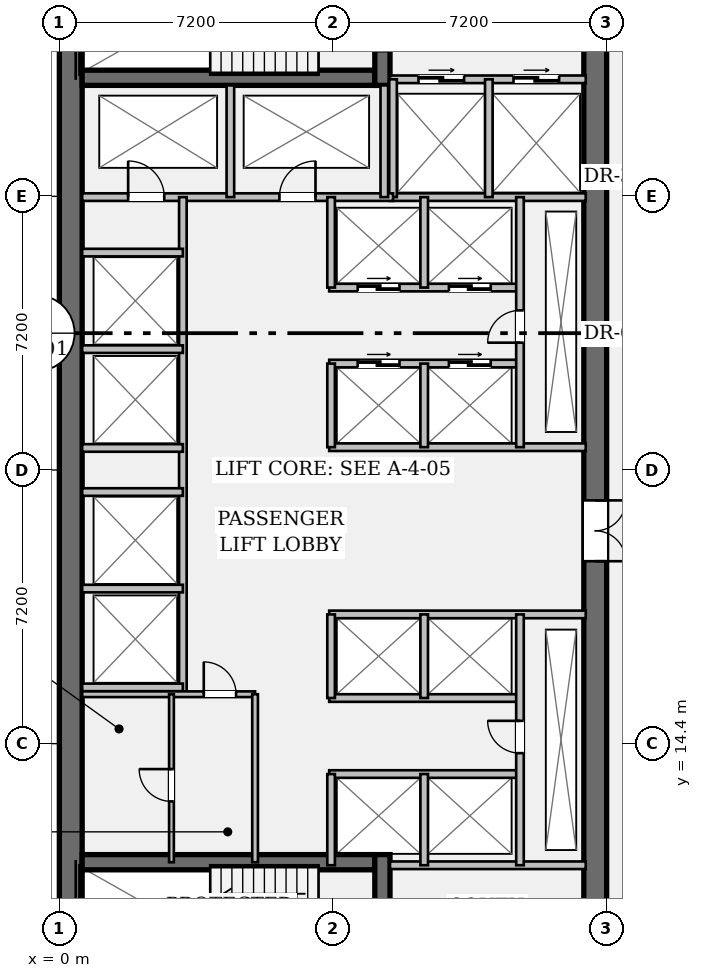
"""IFC4 building model, lengths in metres.
Left out: names, types, materials, properties, quantities, classifications, styles, units other than length and angle.
Written with IfcOpenShell. Run it as: python <this file> out.ifc"""

import sys

from ifc_helpers import new_model, si_unit, direction, frame, frame_2d, origin, place, context, subcontext, project, spatial, rectangle, extrude, element, fill, save


model = new_model("IFC4")
c1 = context("Model", 3, precision=1e-05, world=origin(), true_north=direction((0.0, 1.0)))
c2 = subcontext(c1, "Body", "Model", "MODEL_VIEW")
j1 = project(units=[si_unit("LENGTHUNIT", "METRE"), si_unit("PLANEANGLEUNIT", "RADIAN")], contexts=[c1])
p1 = place(None, origin())
s1 = spatial("IfcSite", under=j1, at=p1, CompositionType="ELEMENT")
p2 = place(p1, origin())
s2 = spatial("IfcBuilding", under=s1, at=p2, CompositionType="ELEMENT")
p3 = place(p2, frame((0.0, 0.0, 77.35)))
s3 = spatial("IfcBuildingStorey", under=s2, at=p3, CompositionType="ELEMENT", Elevation=77.35)
p4 = place(p3, frame((0.3, 7.2, 0.0), z_axis=(0.0, 0.0, 1.0), x_axis=(0.0, 1.0, 0.0)))
e1 = element("IfcWall", 1, at=p4, inside=s3, PredefinedType="SHEAR", context=c2, shape_type="SweptSolid", body=[
    extrude(rectangle(XDim=28.8, YDim=0.6, at=frame_2d((14.4, 0.0))), origin(), (0.0, 0.0, 1.0), 3.57),
])
p5 = place(p3, frame((14.1, 35.4, 0.0), z_axis=(0.0, 0.0, 1.0), x_axis=(0.0, -1.0, 0.0)))
e2 = element("IfcWall", 2, at=p5, inside=s3, PredefinedType="SHEAR", context=c2, shape_type="SweptSolid", body=[
    extrude(rectangle(XDim=27.6, YDim=0.6, at=frame_2d((13.8, 0.0))), origin(), (0.0, 0.0, 1.0), 3.57),
])
p6 = place(p5, frame((1.3, 0.0, 0.0)))
e3 = element("IfcOpeningElement", 3, at=p6, cuts=e2, PredefinedType="OPENING", context=c2, shape_type="SweptSolid", body=[
    extrude(rectangle(XDim=1.2, YDim=2.15, at=frame_2d((0.6, 1.075))), frame((0.0, 0.312, 0.0), z_axis=(0.0, -1.0, 0.0), x_axis=(1.0, 0.0, 0.0)), (0.0, 0.0, 1.0), 0.624),
])
p7 = place(p5, frame((25.25, 0.0, 0.0)))
e4 = element("IfcOpeningElement", 4, at=p7, cuts=e2, PredefinedType="OPENING", context=c2, shape_type="SweptSolid", body=[
    extrude(rectangle(XDim=1.2, YDim=2.15, at=frame_2d((0.6, 1.075))), frame((0.0, 0.312, 0.0), z_axis=(0.0, -1.0, 0.0), x_axis=(1.0, 0.0, 0.0)), (0.0, 0.0, 1.0), 0.624),
])
p8 = place(p5, frame((14.6, 0.0, 0.0)))
e5 = element("IfcOpeningElement", 5, at=p8, cuts=e2, PredefinedType="OPENING", context=c2, shape_type="SweptSolid", body=[
    extrude(rectangle(XDim=1.6, YDim=2.2, at=frame_2d((0.8, 1.1))), frame((0.0, 0.312, 0.0), z_axis=(0.0, -1.0, 0.0), x_axis=(1.0, 0.0, 0.0)), (0.0, 0.0, 1.0), 0.624),
])
for number, where, z_axis, x_axis in (
    (6, (0.6, 31.92, 0.0), (0.0, 0.0, 1.0), (1.0, 0.0, 0.0)),
    (7, (0.6, 11.28, 0.0), (0.0, 0.0, 1.0), (1.0, 0.0, 0.0)),
):
    element("IfcWall", number, at=place(p3, frame(where, z_axis=z_axis, x_axis=x_axis)), inside=s3, PredefinedType="SHEAR", context=c2, shape_type="SweptSolid", body=[
        extrude(rectangle(XDim=7.7, YDim=0.4, at=frame_2d((3.85, 0.0))), origin(), (0.0, 0.0, 1.0), 3.57),
    ])
p9 = place(p3, frame((8.5, 31.72, 0.0), z_axis=(0.0, 0.0, 1.0), x_axis=(0.0, 1.0, 0.0)))
e8 = element("IfcWall", 8, at=p9, inside=s3, PredefinedType="SHEAR", context=c2, shape_type="SweptSolid", body=[
    extrude(rectangle(XDim=3.68, YDim=0.4, at=frame_2d((1.84, 0.0))), origin(), (0.0, 0.0, 1.0), 3.57),
])
p10 = place(p9, frame((0.9, 0.0, 0.0)))
e9 = element("IfcOpeningElement", 9, at=p10, cuts=e8, PredefinedType="OPENING", context=c2, shape_type="SweptSolid", body=[
    extrude(rectangle(XDim=1.1, YDim=2.15, at=frame_2d((0.55, 1.075))), frame((0.0, 0.212, 0.0), z_axis=(0.0, -1.0, 0.0), x_axis=(1.0, 0.0, 0.0)), (0.0, 0.0, 1.0), 0.424),
])
p11 = place(p3, frame((8.5, 7.8, 0.0), z_axis=(0.0, 0.0, 1.0), x_axis=(0.0, 1.0, 0.0)))
e10 = element("IfcWall", 10, at=p11, inside=s3, PredefinedType="SHEAR", context=c2, shape_type="SweptSolid", body=[
    extrude(rectangle(XDim=3.68, YDim=0.4, at=frame_2d((1.84, 0.0))), origin(), (0.0, 0.0, 1.0), 3.57),
])
p12 = place(p11, frame((0.85, 0.0, 0.0)))
e11 = element("IfcOpeningElement", 11, at=p12, cuts=e10, PredefinedType="OPENING", context=c2, shape_type="SweptSolid", body=[
    extrude(rectangle(XDim=1.1, YDim=2.15, at=frame_2d((0.55, 1.075))), frame((0.0, 0.212, 0.0), z_axis=(0.0, -1.0, 0.0), x_axis=(1.0, 0.0, 0.0)), (0.0, 0.0, 1.0), 0.424),
])
p13 = place(p3, frame((8.7, 31.88, 0.0), z_axis=(0.0, 0.0, 1.0), x_axis=(1.0, 0.0, 0.0)))
e12 = element("IfcWall", 12, at=p13, inside=s3, PredefinedType="PARTITIONING", context=c2, shape_type="SweptSolid", body=[
    extrude(rectangle(XDim=5.15, YDim=0.2, at=frame_2d((2.575, 0.0))), origin(), (0.0, 0.0, 1.0), 3.57),
])
p14 = place(p13, frame((0.75, 0.0, 0.0)))
e13 = element("IfcOpeningElement", 13, at=p14, cuts=e12, PredefinedType="OPENING", context=c2, shape_type="SweptSolid", body=[
    extrude(rectangle(XDim=1.2, YDim=2.2, at=frame_2d((0.6, 1.1))), frame((0.0, 0.112, 0.0), z_axis=(0.0, -1.0, 0.0), x_axis=(1.0, 0.0, 0.0)), (0.0, 0.0, 1.0), 0.224),
])
p15 = place(p13, frame((3.25, 0.0, 0.0)))
e14 = element("IfcOpeningElement", 14, at=p15, cuts=e12, PredefinedType="OPENING", context=c2, shape_type="SweptSolid", body=[
    extrude(rectangle(XDim=1.2, YDim=2.2, at=frame_2d((0.6, 1.1))), frame((0.0, 0.112, 0.0), z_axis=(0.0, -1.0, 0.0), x_axis=(1.0, 0.0, 0.0)), (0.0, 0.0, 1.0), 0.224),
])
for number, where, z_axis, x_axis in (
    (15, (8.7, 11.2, 0.0), (0.0, 0.0, 1.0), (1.0, 0.0, 0.0)),
    (16, (8.7, 28.78, 0.0), (0.0, 0.0, 1.0), (1.0, 0.0, 0.0)),
):
    element("IfcWall", number, at=place(p3, frame(where, z_axis=z_axis, x_axis=x_axis)), inside=s3, PredefinedType="PARTITIONING", context=c2, shape_type="SweptSolid", body=[
        extrude(rectangle(XDim=5.15, YDim=0.2, at=frame_2d((2.575, 0.0))), origin(), (0.0, 0.0, 1.0), 3.57),
    ])
for number, where, z_axis, x_axis in (
    (17, (8.78, 28.78, 0.0), (0.0, 0.0, 1.0), (0.0, 1.0, 0.0)),
    (18, (11.3, 28.78, 0.0), (0.0, 0.0, 1.0), (0.0, 1.0, 0.0)),
):
    element("IfcWall", number, at=place(p3, frame(where, z_axis=z_axis, x_axis=x_axis)), inside=s3, PredefinedType="PARTITIONING", context=c2, shape_type="SweptSolid", body=[
        extrude(rectangle(XDim=3.1, YDim=0.2, at=frame_2d((1.55, 0.0))), origin(), (0.0, 0.0, 1.0), 3.57),
    ])
p16 = place(p3, frame((0.6, 28.78, 0.0), z_axis=(0.0, 0.0, 1.0), x_axis=(1.0, 0.0, 0.0)))
e19 = element("IfcWall", 19, at=p16, inside=s3, PredefinedType="PARTITIONING", context=c2, shape_type="SweptSolid", body=[
    extrude(rectangle(XDim=8.18, YDim=0.2, at=frame_2d((4.09, 0.0))), origin(), (0.0, 0.0, 1.0), 3.57),
])
p17 = place(p16, frame((1.21, 0.0, 0.0)))
e20 = element("IfcOpeningElement", 20, at=p17, cuts=e19, PredefinedType="OPENING", context=c2, shape_type="SweptSolid", body=[
    extrude(rectangle(XDim=0.95, YDim=2.15, at=frame_2d((0.475, 1.075))), frame((0.0, 0.112, 0.0), z_axis=(0.0, -1.0, 0.0), x_axis=(1.0, 0.0, 0.0)), (0.0, 0.0, 1.0), 0.224),
])
p18 = place(p16, frame((5.19, 0.0, 0.0)))
e21 = element("IfcOpeningElement", 21, at=p18, cuts=e19, PredefinedType="OPENING", context=c2, shape_type="SweptSolid", body=[
    extrude(rectangle(XDim=0.95, YDim=2.15, at=frame_2d((0.475, 1.075))), frame((0.0, 0.112, 0.0), z_axis=(0.0, -1.0, 0.0), x_axis=(1.0, 0.0, 0.0)), (0.0, 0.0, 1.0), 0.224),
])
for number, where, z_axis, x_axis in (
    (22, (4.5, 28.78, 0.0), (0.0, 0.0, 1.0), (0.0, 1.0, 0.0)),
    (23, (8.55, 28.78, 0.0), (0.0, 0.0, 1.0), (0.0, 1.0, 0.0)),
):
    element("IfcWall", number, at=place(p3, frame(where, z_axis=z_axis, x_axis=x_axis)), inside=s3, PredefinedType="PARTITIONING", context=c2, shape_type="SweptSolid", body=[
        extrude(rectangle(XDim=2.94, YDim=0.2, at=frame_2d((1.47, 0.0))), origin(), (0.0, 0.0, 1.0), 3.57),
    ])
p19 = place(p3, frame((3.25, 15.7, 0.0), z_axis=(0.0, 0.0, 1.0), x_axis=(0.0, 1.0, 0.0)))
e24 = element("IfcWall", 24, at=p19, inside=s3, PredefinedType="PARTITIONING", context=c2, shape_type="SweptSolid", body=[
    extrude(rectangle(XDim=13.08, YDim=0.2, at=frame_2d((6.54, 0.0))), origin(), (0.0, 0.0, 1.0), 3.57),
])
for number, where, z_axis, x_axis in (
    (25, (0.6, 15.88, 0.0), (0.0, 0.0, 1.0), (1.0, 0.0, 0.0)),
    (26, (0.6, 18.48, 0.0), (0.0, 0.0, 1.0), (1.0, 0.0, 0.0)),
    (27, (0.6, 22.18, 0.0), (0.0, 0.0, 1.0), (1.0, 0.0, 0.0)),
    (28, (0.6, 24.78, 0.0), (0.0, 0.0, 1.0), (1.0, 0.0, 0.0)),
    (29, (0.6, 21.02, 0.0), (0.0, 0.0, 1.0), (1.0, 0.0, 0.0)),
    (30, (0.6, 27.32, 0.0), (0.0, 0.0, 1.0), (1.0, 0.0, 0.0)),
):
    element("IfcWall", number, at=place(p3, frame(where, z_axis=z_axis, x_axis=x_axis)), inside=s3, PredefinedType="PARTITIONING", context=c2, shape_type="SweptSolid", body=[
        extrude(rectangle(XDim=2.65, YDim=0.2, at=frame_2d((1.325, 0.0))), origin(), (0.0, 0.0, 1.0), 3.57),
    ])
p20 = place(p3, frame((7.1, 22.2, 0.0), z_axis=(0.0, 0.0, 1.0), x_axis=(1.0, 0.0, 0.0)))
e31 = element("IfcWall", 31, at=p20, inside=s3, PredefinedType="PARTITIONING", context=c2, shape_type="SweptSolid", body=[
    extrude(rectangle(XDim=6.75, YDim=0.2, at=frame_2d((3.375, 0.0))), origin(), (0.0, 0.0, 1.0), 3.57),
])
p21 = place(p3, frame((7.1, 24.4, 0.0), z_axis=(0.0, 0.0, 1.0), x_axis=(1.0, 0.0, 0.0)))
e32 = element("IfcWall", 32, at=p21, inside=s3, PredefinedType="PARTITIONING", context=c2, shape_type="SweptSolid", body=[
    extrude(rectangle(XDim=5.02, YDim=0.2, at=frame_2d((2.51, 0.0))), origin(), (0.0, 0.0, 1.0), 3.57),
])
p22 = place(p21, frame((0.75, 0.0, 0.0)))
e33 = element("IfcOpeningElement", 33, at=p22, cuts=e32, PredefinedType="OPENING", context=c2, shape_type="SweptSolid", body=[
    extrude(rectangle(XDim=1.1, YDim=2.2, at=frame_2d((0.55, 1.1))), frame((0.0, 0.112, 0.0), z_axis=(0.0, -1.0, 0.0), x_axis=(1.0, 0.0, 0.0)), (0.0, 0.0, 1.0), 0.224),
])
p23 = place(p21, frame((3.15, 0.0, 0.0)))
e34 = element("IfcOpeningElement", 34, at=p23, cuts=e32, PredefinedType="OPENING", context=c2, shape_type="SweptSolid", body=[
    extrude(rectangle(XDim=1.1, YDim=2.2, at=frame_2d((0.55, 1.1))), frame((0.0, 0.112, 0.0), z_axis=(0.0, -1.0, 0.0), x_axis=(1.0, 0.0, 0.0)), (0.0, 0.0, 1.0), 0.224),
])
p24 = place(p3, frame((7.1, 26.4, 0.0), z_axis=(0.0, 0.0, 1.0), x_axis=(1.0, 0.0, 0.0)))
e35 = element("IfcWall", 35, at=p24, inside=s3, PredefinedType="PARTITIONING", context=c2, shape_type="SweptSolid", body=[
    extrude(rectangle(XDim=5.02, YDim=0.2, at=frame_2d((2.51, 0.0))), origin(), (0.0, 0.0, 1.0), 3.57),
])
p25 = place(p24, frame((0.75, 0.0, 0.0)))
e36 = element("IfcOpeningElement", 36, at=p25, cuts=e35, PredefinedType="OPENING", context=c2, shape_type="SweptSolid", body=[
    extrude(rectangle(XDim=1.1, YDim=2.2, at=frame_2d((0.55, 1.1))), frame((0.0, 0.112, 0.0), z_axis=(0.0, -1.0, 0.0), x_axis=(1.0, 0.0, 0.0)), (0.0, 0.0, 1.0), 0.224),
])
p26 = place(p24, frame((3.15, 0.0, 0.0)))
e37 = element("IfcOpeningElement", 37, at=p26, cuts=e35, PredefinedType="OPENING", context=c2, shape_type="SweptSolid", body=[
    extrude(rectangle(XDim=1.1, YDim=2.2, at=frame_2d((0.55, 1.1))), frame((0.0, 0.112, 0.0), z_axis=(0.0, -1.0, 0.0), x_axis=(1.0, 0.0, 0.0)), (0.0, 0.0, 1.0), 0.224),
])
p27 = place(p3, frame((7.15, 22.2, 0.0), z_axis=(0.0, 0.0, 1.0), x_axis=(0.0, 1.0, 0.0)))
e38 = element("IfcWall", 38, at=p27, inside=s3, PredefinedType="PARTITIONING", context=c2, shape_type="SweptSolid", body=[
    extrude(rectangle(XDim=2.2, YDim=0.2, at=frame_2d((1.1, 0.0))), origin(), (0.0, 0.0, 1.0), 3.57),
])
p28 = place(p3, frame((7.15, 26.4, 0.0), z_axis=(0.0, 0.0, 1.0), x_axis=(0.0, 1.0, 0.0)))
e39 = element("IfcWall", 39, at=p28, inside=s3, PredefinedType="PARTITIONING", context=c2, shape_type="SweptSolid", body=[
    extrude(rectangle(XDim=2.38, YDim=0.2, at=frame_2d((1.19, 0.0))), origin(), (0.0, 0.0, 1.0), 3.57),
])
p29 = place(p3, frame((9.6, 22.2, 0.0), z_axis=(0.0, 0.0, 1.0), x_axis=(0.0, 1.0, 0.0)))
e40 = element("IfcWall", 40, at=p29, inside=s3, PredefinedType="PARTITIONING", context=c2, shape_type="SweptSolid", body=[
    extrude(rectangle(XDim=2.2, YDim=0.2, at=frame_2d((1.1, 0.0))), origin(), (0.0, 0.0, 1.0), 3.57),
])
p30 = place(p3, frame((9.6, 26.4, 0.0), z_axis=(0.0, 0.0, 1.0), x_axis=(0.0, 1.0, 0.0)))
e41 = element("IfcWall", 41, at=p30, inside=s3, PredefinedType="PARTITIONING", context=c2, shape_type="SweptSolid", body=[
    extrude(rectangle(XDim=2.38, YDim=0.2, at=frame_2d((1.19, 0.0))), origin(), (0.0, 0.0, 1.0), 3.57),
])
p31 = place(p3, frame((12.12, 22.2, 0.0), z_axis=(0.0, 0.0, 1.0), x_axis=(0.0, 1.0, 0.0)))
e42 = element("IfcWall", 42, at=p31, inside=s3, PredefinedType="PARTITIONING", context=c2, shape_type="SweptSolid", body=[
    extrude(rectangle(XDim=6.58, YDim=0.2, at=frame_2d((3.29, 0.0))), origin(), (0.0, 0.0, 1.0), 3.57),
])
p32 = place(p31, frame((2.75, 0.0, 0.0)))
e43 = element("IfcOpeningElement", 43, at=p32, cuts=e42, PredefinedType="OPENING", context=c2, shape_type="SweptSolid", body=[
    extrude(rectangle(XDim=0.85, YDim=2.15, at=frame_2d((0.425, 1.075))), frame((0.0, 0.112, 0.0), z_axis=(0.0, -1.0, 0.0), x_axis=(1.0, 0.0, 0.0)), (0.0, 0.0, 1.0), 0.224),
])
p33 = place(p3, frame((7.1, 17.8, 0.0), z_axis=(0.0, 0.0, 1.0), x_axis=(1.0, 0.0, 0.0)))
e44 = element("IfcWall", 44, at=p33, inside=s3, PredefinedType="PARTITIONING", context=c2, shape_type="SweptSolid", body=[
    extrude(rectangle(XDim=6.75, YDim=0.2, at=frame_2d((3.375, 0.0))), origin(), (0.0, 0.0, 1.0), 3.57),
])
for number, where, z_axis, x_axis in (
    (45, (7.1, 15.6, 0.0), (0.0, 0.0, 1.0), (1.0, 0.0, 0.0)),
    (46, (7.1, 13.6, 0.0), (0.0, 0.0, 1.0), (1.0, 0.0, 0.0)),
):
    element("IfcWall", number, at=place(p3, frame(where, z_axis=z_axis, x_axis=x_axis)), inside=s3, PredefinedType="PARTITIONING", context=c2, shape_type="SweptSolid", body=[
        extrude(rectangle(XDim=5.02, YDim=0.2, at=frame_2d((2.51, 0.0))), origin(), (0.0, 0.0, 1.0), 3.57),
    ])
p34 = place(p3, frame((7.15, 15.6, 0.0), z_axis=(0.0, 0.0, 1.0), x_axis=(0.0, 1.0, 0.0)))
e47 = element("IfcWall", 47, at=p34, inside=s3, PredefinedType="PARTITIONING", context=c2, shape_type="SweptSolid", body=[
    extrude(rectangle(XDim=2.2, YDim=0.2, at=frame_2d((1.1, 0.0))), origin(), (0.0, 0.0, 1.0), 3.57),
])
p35 = place(p3, frame((7.15, 11.2, 0.0), z_axis=(0.0, 0.0, 1.0), x_axis=(0.0, 1.0, 0.0)))
e48 = element("IfcWall", 48, at=p35, inside=s3, PredefinedType="PARTITIONING", context=c2, shape_type="SweptSolid", body=[
    extrude(rectangle(XDim=2.4, YDim=0.2, at=frame_2d((1.2, 0.0))), origin(), (0.0, 0.0, 1.0), 3.57),
])
p36 = place(p3, frame((9.6, 15.6, 0.0), z_axis=(0.0, 0.0, 1.0), x_axis=(0.0, 1.0, 0.0)))
e49 = element("IfcWall", 49, at=p36, inside=s3, PredefinedType="PARTITIONING", context=c2, shape_type="SweptSolid", body=[
    extrude(rectangle(XDim=2.2, YDim=0.2, at=frame_2d((1.1, 0.0))), origin(), (0.0, 0.0, 1.0), 3.57),
])
p37 = place(p3, frame((9.6, 11.2, 0.0), z_axis=(0.0, 0.0, 1.0), x_axis=(0.0, 1.0, 0.0)))
e50 = element("IfcWall", 50, at=p37, inside=s3, PredefinedType="PARTITIONING", context=c2, shape_type="SweptSolid", body=[
    extrude(rectangle(XDim=2.4, YDim=0.2, at=frame_2d((1.2, 0.0))), origin(), (0.0, 0.0, 1.0), 3.57),
])
p38 = place(p3, frame((12.12, 11.2, 0.0), z_axis=(0.0, 0.0, 1.0), x_axis=(0.0, 1.0, 0.0)))
e51 = element("IfcWall", 51, at=p38, inside=s3, PredefinedType="PARTITIONING", context=c2, shape_type="SweptSolid", body=[
    extrude(rectangle(XDim=6.6, YDim=0.2, at=frame_2d((3.3, 0.0))), origin(), (0.0, 0.0, 1.0), 3.57),
])
p39 = place(p38, frame((2.95, 0.0, 0.0)))
e52 = element("IfcOpeningElement", 52, at=p39, cuts=e51, PredefinedType="OPENING", context=c2, shape_type="SweptSolid", body=[
    extrude(rectangle(XDim=0.85, YDim=2.15, at=frame_2d((0.425, 1.075))), frame((0.0, 0.112, 0.0), z_axis=(0.0, -1.0, 0.0), x_axis=(1.0, 0.0, 0.0)), (0.0, 0.0, 1.0), 0.224),
])
p40 = place(p3, frame((0.6, 15.7, 0.0), z_axis=(0.0, 0.0, 1.0), x_axis=(1.0, 0.0, 0.0)))
e53 = element("IfcWall", 53, at=p40, inside=s3, PredefinedType="PARTITIONING", context=c2, shape_type="SweptSolid", body=[
    extrude(rectangle(XDim=4.55, YDim=0.15, at=frame_2d((2.275, 0.0))), origin(), (0.0, 0.0, 1.0), 3.57),
])
p41 = place(p40, frame((3.2, 0.0, 0.0)))
e54 = element("IfcOpeningElement", 54, at=p41, cuts=e53, PredefinedType="OPENING", context=c2, shape_type="SweptSolid", body=[
    extrude(rectangle(XDim=0.85, YDim=2.15, at=frame_2d((0.425, 1.075))), frame((0.0, 0.087, 0.0), z_axis=(0.0, -1.0, 0.0), x_axis=(1.0, 0.0, 0.0)), (0.0, 0.0, 1.0), 0.174),
])
p42 = place(p3, frame((5.15, 11.28, 0.0), z_axis=(0.0, 0.0, 1.0), x_axis=(0.0, 1.0, 0.0)))
e55 = element("IfcWall", 55, at=p42, inside=s3, PredefinedType="PARTITIONING", context=c2, shape_type="SweptSolid", body=[
    extrude(rectangle(XDim=4.42, YDim=0.15, at=frame_2d((2.21, 0.0))), origin(), (0.0, 0.0, 1.0), 3.57),
])
p43 = place(p3, frame((2.95, 11.28, 0.0), z_axis=(0.0, 0.0, 1.0), x_axis=(0.0, 1.0, 0.0)))
e56 = element("IfcWall", 56, at=p43, inside=s3, PredefinedType="PARTITIONING", context=c2, shape_type="SweptSolid", body=[
    extrude(rectangle(XDim=4.42, YDim=0.125, at=frame_2d((2.21, 0.0))), origin(), (0.0, 0.0, 1.0), 3.57),
])
p44 = place(p43, frame((1.6, 0.0, 0.0)))
e57 = element("IfcOpeningElement", 57, at=p44, cuts=e56, PredefinedType="OPENING", context=c2, shape_type="SweptSolid", body=[
    extrude(rectangle(XDim=0.85, YDim=2.15, at=frame_2d((0.425, 1.075))), frame((0.0, 0.074, 0.0), z_axis=(0.0, -1.0, 0.0), x_axis=(1.0, 0.0, 0.0)), (0.0, 0.0, 1.0), 0.149),
])
p45 = place(p14, origin())
e58 = element("IfcDoor", 58, at=p45, inside=s3, OperationType="DOUBLE_DOOR_SLIDING", PredefinedType="DOOR", context=c2, shape_type="SweptSolid", body=[
    extrude(rectangle(XDim=1.2, YDim=2.2, at=frame_2d((0.6, 1.1))), frame((0.0, 0.025, 0.0), z_axis=(0.0, -1.0, 0.0), x_axis=(1.0, 0.0, 0.0)), (0.0, 0.0, 1.0), 0.05),
])
fill(e13, e58)
p46 = place(p15, origin())
e59 = element("IfcDoor", 59, at=p46, inside=s3, OperationType="DOUBLE_DOOR_SLIDING", PredefinedType="DOOR", context=c2, shape_type="SweptSolid", body=[
    extrude(rectangle(XDim=1.2, YDim=2.2, at=frame_2d((0.6, 1.1))), frame((0.0, 0.025, 0.0), z_axis=(0.0, -1.0, 0.0), x_axis=(1.0, 0.0, 0.0)), (0.0, 0.0, 1.0), 0.05),
])
fill(e14, e59)
p47 = place(p17, origin())
e60 = element("IfcDoor", 60, at=p47, inside=s3, OperationType="SINGLE_SWING_LEFT", PredefinedType="DOOR", context=c2, shape_type="SweptSolid", body=[
    extrude(rectangle(XDim=0.95, YDim=2.15, at=frame_2d((0.475, 1.075))), frame((0.0, 0.025, 0.0), z_axis=(0.0, -1.0, 0.0), x_axis=(1.0, 0.0, 0.0)), (0.0, 0.0, 1.0), 0.05),
])
fill(e20, e60)
p48 = place(p18, origin())
e61 = element("IfcDoor", 61, at=p48, inside=s3, OperationType="SINGLE_SWING_RIGHT", PredefinedType="DOOR", context=c2, shape_type="SweptSolid", body=[
    extrude(rectangle(XDim=0.95, YDim=2.15, at=frame_2d((0.475, 1.075))), frame((0.0, 0.025, 0.0), z_axis=(0.0, -1.0, 0.0), x_axis=(1.0, 0.0, 0.0)), (0.0, 0.0, 1.0), 0.05),
])
fill(e21, e61)
p49 = place(p8, origin())
e62 = element("IfcDoor", 62, at=p49, inside=s3, OperationType="DOUBLE_DOOR_SINGLE_SWING", PredefinedType="DOOR", context=c2, shape_type="SweptSolid", body=[
    extrude(rectangle(XDim=1.6, YDim=2.2, at=frame_2d((0.8, 1.1))), frame((0.0, 0.025, 0.0), z_axis=(0.0, -1.0, 0.0), x_axis=(1.0, 0.0, 0.0)), (0.0, 0.0, 1.0), 0.05),
])
fill(e5, e62)
p50 = place(p32, origin())
e63 = element("IfcDoor", 63, at=p50, inside=s3, OperationType="SINGLE_SWING_LEFT", PredefinedType="DOOR", context=c2, shape_type="SweptSolid", body=[
    extrude(rectangle(XDim=0.85, YDim=2.15, at=frame_2d((0.425, 1.075))), frame((0.0, 0.025, 0.0), z_axis=(0.0, -1.0, 0.0), x_axis=(1.0, 0.0, 0.0)), (0.0, 0.0, 1.0), 0.05),
])
fill(e43, e63)
p51 = place(p22, origin())
e64 = element("IfcDoor", 64, at=p51, inside=s3, OperationType="DOUBLE_DOOR_SLIDING", PredefinedType="DOOR", context=c2, shape_type="SweptSolid", body=[
    extrude(rectangle(XDim=1.1, YDim=2.2, at=frame_2d((0.55, 1.1))), frame((0.0, 0.025, 0.0), z_axis=(0.0, -1.0, 0.0), x_axis=(1.0, 0.0, 0.0)), (0.0, 0.0, 1.0), 0.05),
])
fill(e33, e64)
p52 = place(p23, origin())
e65 = element("IfcDoor", 65, at=p52, inside=s3, OperationType="DOUBLE_DOOR_SLIDING", PredefinedType="DOOR", context=c2, shape_type="SweptSolid", body=[
    extrude(rectangle(XDim=1.1, YDim=2.2, at=frame_2d((0.55, 1.1))), frame((0.0, 0.025, 0.0), z_axis=(0.0, -1.0, 0.0), x_axis=(1.0, 0.0, 0.0)), (0.0, 0.0, 1.0), 0.05),
])
fill(e34, e65)
p53 = place(p25, origin())
e66 = element("IfcDoor", 66, at=p53, inside=s3, OperationType="DOUBLE_DOOR_SLIDING", PredefinedType="DOOR", context=c2, shape_type="SweptSolid", body=[
    extrude(rectangle(XDim=1.1, YDim=2.2, at=frame_2d((0.55, 1.1))), frame((0.0, 0.025, 0.0), z_axis=(0.0, -1.0, 0.0), x_axis=(1.0, 0.0, 0.0)), (0.0, 0.0, 1.0), 0.05),
])
fill(e36, e66)
p54 = place(p26, origin())
e67 = element("IfcDoor", 67, at=p54, inside=s3, OperationType="DOUBLE_DOOR_SLIDING", PredefinedType="DOOR", context=c2, shape_type="SweptSolid", body=[
    extrude(rectangle(XDim=1.1, YDim=2.2, at=frame_2d((0.55, 1.1))), frame((0.0, 0.025, 0.0), z_axis=(0.0, -1.0, 0.0), x_axis=(1.0, 0.0, 0.0)), (0.0, 0.0, 1.0), 0.05),
])
fill(e37, e67)
p55 = place(p39, origin())
e68 = element("IfcDoor", 68, at=p55, inside=s3, OperationType="SINGLE_SWING_RIGHT", PredefinedType="DOOR", context=c2, shape_type="SweptSolid", body=[
    extrude(rectangle(XDim=0.85, YDim=2.15, at=frame_2d((0.425, 1.075))), frame((0.0, 0.025, 0.0), z_axis=(0.0, -1.0, 0.0), x_axis=(1.0, 0.0, 0.0)), (0.0, 0.0, 1.0), 0.05),
])
fill(e52, e68)
p56 = place(p41, origin())
e69 = element("IfcDoor", 69, at=p56, inside=s3, OperationType="SINGLE_SWING_LEFT", PredefinedType="DOOR", context=c2, shape_type="SweptSolid", body=[
    extrude(rectangle(XDim=0.85, YDim=2.15, at=frame_2d((0.425, 1.075))), frame((0.0, 0.025, 0.0), z_axis=(0.0, -1.0, 0.0), x_axis=(1.0, 0.0, 0.0)), (0.0, 0.0, 1.0), 0.05),
])
fill(e54, e69)
p57 = place(p44, origin())
e70 = element("IfcDoor", 70, at=p57, inside=s3, OperationType="SINGLE_SWING_RIGHT", PredefinedType="DOOR", context=c2, shape_type="SweptSolid", body=[
    extrude(rectangle(XDim=0.85, YDim=2.15, at=frame_2d((0.425, 1.075))), frame((0.0, 0.025, 0.0), z_axis=(0.0, -1.0, 0.0), x_axis=(1.0, 0.0, 0.0)), (0.0, 0.0, 1.0), 0.05),
])
fill(e57, e70)
save(model, sys.argv[1])
